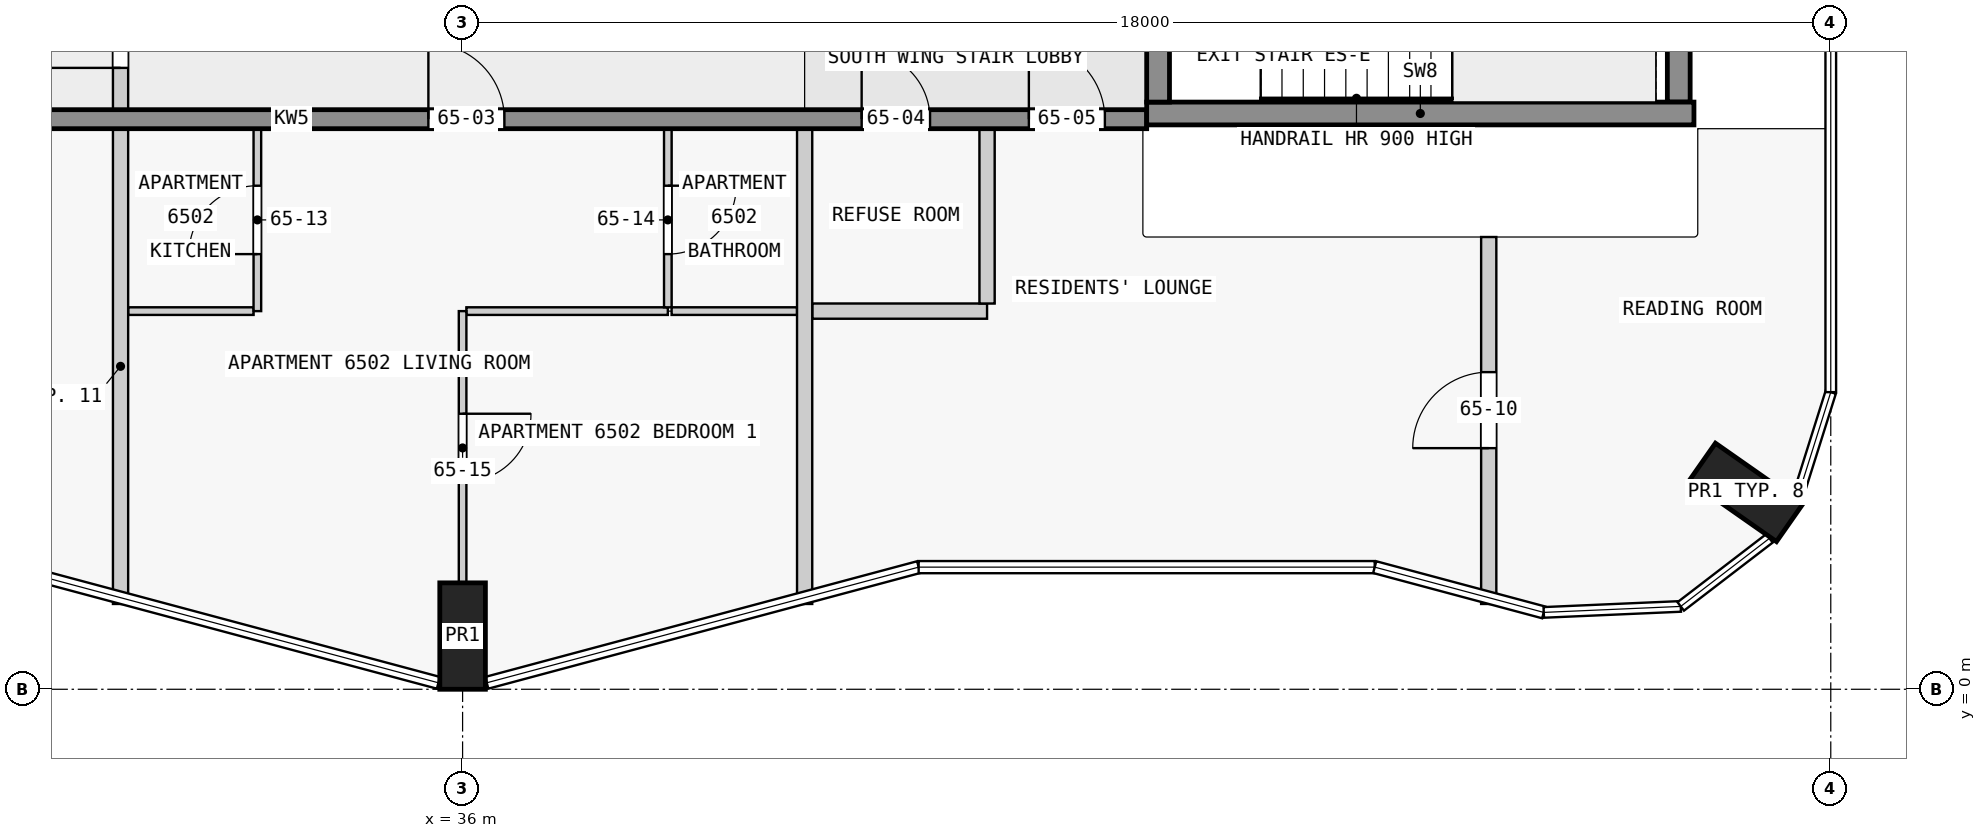
"""IFC4 building model, lengths in metres.
Left out: names, types, materials, properties, quantities, classifications, styles, units other than length and angle.
Written with IfcOpenShell. Run it as: python <this file> out.ifc"""

import sys

from ifc_helpers import new_model, si_unit, direction, frame, frame_2d, origin, origin_2d, place, context, subcontext, project, spatial, rectangle, extrude, element, fill, save


model = new_model("IFC4")
c1 = context("Model", 3, precision=1e-05, world=origin(), true_north=direction((0.0, 1.0)))
c2 = subcontext(c1, "Body", "Model", "MODEL_VIEW")
j1 = project(units=[si_unit("LENGTHUNIT", "METRE"), si_unit("PLANEANGLEUNIT", "RADIAN")], contexts=[c1])
p1 = place(None, origin())
s1 = spatial("IfcSite", under=j1, at=p1, CompositionType="ELEMENT")
p2 = place(p1, origin())
s2 = spatial("IfcBuilding", under=s1, at=p2, CompositionType="ELEMENT")
p3 = place(p2, frame((0.0, 0.0, 249.4)))
s3 = spatial("IfcBuildingStorey", under=s2, at=p3, CompositionType="ELEMENT", Elevation=249.4)
for number, where, z_axis, x_axis in (
    (1, (36.0, 0.7, 0.0), (0.0, 0.0, 1.0), (1.0, 0.0, 0.0)),
    (2, (52.884, 2.59, 0.0), (0.0, 0.0, 1.0), (0.574, 0.819, 0.0)),
):
    element("IfcColumn", number, at=place(p3, frame(where, z_axis=z_axis, x_axis=x_axis)), inside=s3, PredefinedType="COLUMN", context=c2, shape_type="SweptSolid", body=[
        extrude(rectangle(XDim=0.6, YDim=1.4, at=origin_2d()), origin(), (0.0, 0.0, 1.0), 3.5),
    ])
p4 = place(p3, frame((45.15, 7.725, 0.0), z_axis=(0.0, 0.0, 1.0), x_axis=(0.0, 1.0, 0.0)))
e3 = element("IfcWall", 3, at=p4, inside=s3, PredefinedType="SHEAR", context=c2, shape_type="SweptSolid", body=[
    extrude(rectangle(XDim=2.55, YDim=0.3, at=frame_2d((1.275, 0.0))), origin(), (0.0, 0.0, 1.0), 3.5),
])
p5 = place(p4, frame((0.725, 0.0, 0.0)))
e4 = element("IfcOpeningElement", 4, at=p5, cuts=e3, PredefinedType="OPENING", context=c2, shape_type="SweptSolid", body=[
    extrude(rectangle(XDim=1.1, YDim=2.1, at=frame_2d((0.55, 1.05))), frame((0.0, 0.16, 0.0), z_axis=(0.0, -1.0, 0.0), x_axis=(1.0, 0.0, 0.0)), (0.0, 0.0, 1.0), 0.32),
])
p6 = place(p3, frame((52.0, 7.725, 0.0), z_axis=(0.0, 0.0, 1.0), x_axis=(0.0, 1.0, 0.0)))
e5 = element("IfcWall", 5, at=p6, inside=s3, PredefinedType="SHEAR", context=c2, shape_type="SweptSolid", body=[
    extrude(rectangle(XDim=2.55, YDim=0.3, at=frame_2d((1.275, 0.0))), origin(), (0.0, 0.0, 1.0), 3.5),
])
p7 = place(p3, frame((45.0, 7.575, 0.0), z_axis=(0.0, 0.0, 1.0), x_axis=(1.0, 0.0, 0.0)))
e6 = element("IfcWall", 6, at=p7, inside=s3, PredefinedType="SHEAR", context=c2, shape_type="SweptSolid", body=[
    extrude(rectangle(XDim=7.2, YDim=0.3, at=frame_2d((3.6, 0.0))), origin(), (0.0, 0.0, 1.0), 3.5),
])
p8 = place(p3, frame((22.5, 7.5, 0.0), z_axis=(0.0, 0.0, 1.0), x_axis=(1.0, 0.0, 0.0)))
e7 = element("IfcWall", 7, at=p8, inside=s3, PredefinedType="SHEAR", context=c2, shape_type="SweptSolid", body=[
    extrude(rectangle(XDim=22.5, YDim=0.25, at=frame_2d((11.25, 0.0))), origin(), (0.0, 0.0, 1.0), 3.25),
])
p9 = place(p8, frame((1.75, 0.0, 0.0)))
e8 = element("IfcOpeningElement", 8, at=p9, cuts=e7, PredefinedType="OPENING", context=c2, shape_type="SweptSolid", body=[
    extrude(rectangle(XDim=1.0, YDim=2.1, at=frame_2d((0.5, 1.05))), frame((0.0, 0.135, 0.0), z_axis=(0.0, -1.0, 0.0), x_axis=(1.0, 0.0, 0.0)), (0.0, 0.0, 1.0), 0.27),
])
p10 = place(p8, frame((5.85, 0.0, 0.0)))
e9 = element("IfcOpeningElement", 9, at=p10, cuts=e7, PredefinedType="OPENING", context=c2, shape_type="SweptSolid", body=[
    extrude(rectangle(XDim=1.8, YDim=2.1, at=frame_2d((0.9, 1.05))), frame((0.0, 0.135, 0.0), z_axis=(0.0, -1.0, 0.0), x_axis=(1.0, 0.0, 0.0)), (0.0, 0.0, 1.0), 0.27),
])
p11 = place(p8, frame((13.05, 0.0, 0.0)))
e10 = element("IfcOpeningElement", 10, at=p11, cuts=e7, PredefinedType="OPENING", context=c2, shape_type="SweptSolid", body=[
    extrude(rectangle(XDim=1.0, YDim=2.1, at=frame_2d((0.5, 1.05))), frame((0.0, 0.135, 0.0), z_axis=(0.0, -1.0, 0.0), x_axis=(1.0, 0.0, 0.0)), (0.0, 0.0, 1.0), 0.27),
])
p12 = place(p8, frame((18.75, 0.0, 0.0)))
e11 = element("IfcOpeningElement", 11, at=p12, cuts=e7, PredefinedType="OPENING", context=c2, shape_type="SweptSolid", body=[
    extrude(rectangle(XDim=0.9, YDim=2.1, at=frame_2d((0.45, 1.05))), frame((0.0, 0.135, 0.0), z_axis=(0.0, -1.0, 0.0), x_axis=(1.0, 0.0, 0.0)), (0.0, 0.0, 1.0), 0.27),
])
p13 = place(p8, frame((20.95, 0.0, 0.0)))
e12 = element("IfcOpeningElement", 12, at=p13, cuts=e7, PredefinedType="OPENING", context=c2, shape_type="SweptSolid", body=[
    extrude(rectangle(XDim=1.0, YDim=2.1, at=frame_2d((0.5, 1.05))), frame((0.0, 0.135, 0.0), z_axis=(0.0, -1.0, 0.0), x_axis=(1.0, 0.0, 0.0)), (0.0, 0.0, 1.0), 0.27),
])
p14 = place(p3, frame((38.7, 4.975, 0.0), z_axis=(0.0, 0.0, 1.0), x_axis=(-1.0, 0.0, 0.0)))
e13 = element("IfcWall", 13, at=p14, inside=s3, PredefinedType="PARTITIONING", context=c2, shape_type="SweptSolid", body=[
    extrude(rectangle(XDim=2.65, YDim=0.1, at=frame_2d((1.325, 0.0))), origin(), (0.0, 0.0, 1.0), 3.25),
])
for number, where, z_axis, x_axis in (
    (14, (31.6, 4.975, 0.0), (0.0, 0.0, 1.0), (1.0, 0.0, 0.0)),
    (15, (38.75, 4.975, 0.0), (0.0, 0.0, 1.0), (1.0, 0.0, 0.0)),
):
    element("IfcWall", number, at=place(p3, frame(where, z_axis=z_axis, x_axis=x_axis)), inside=s3, PredefinedType="PARTITIONING", context=c2, shape_type="SweptSolid", body=[
        extrude(rectangle(XDim=1.65, YDim=0.1, at=frame_2d((0.825, 0.0))), origin(), (0.0, 0.0, 1.0), 3.25),
    ])
p15 = place(p3, frame((40.6, 4.975, 0.0), z_axis=(0.0, 0.0, 1.0), x_axis=(1.0, 0.0, 0.0)))
e16 = element("IfcWall", 16, at=p15, inside=s3, PredefinedType="PARTITIONING", context=c2, shape_type="SweptSolid", body=[
    extrude(rectangle(XDim=2.3, YDim=0.2, at=frame_2d((1.15, 0.0))), origin(), (0.0, 0.0, 1.0), 3.25),
])
p16 = place(p3, frame((31.5, 1.122, 0.0), z_axis=(0.0, 0.0, 1.0), x_axis=(0.0, 1.0, 0.0)))
e17 = element("IfcWall", 17, at=p16, inside=s3, PredefinedType="PARTITIONING", context=c2, shape_type="SweptSolid", body=[
    extrude(rectangle(XDim=6.253, YDim=0.2, at=frame_2d((3.126, 0.0))), origin(), (0.0, 0.0, 1.0), 3.25),
])
p17 = place(p3, frame((33.3, 4.975, 0.0), z_axis=(0.0, 0.0, 1.0), x_axis=(0.0, 1.0, 0.0)))
e18 = element("IfcWall", 18, at=p17, inside=s3, PredefinedType="PARTITIONING", context=c2, shape_type="SweptSolid", body=[
    extrude(rectangle(XDim=2.4, YDim=0.1, at=frame_2d((1.2, 0.0))), origin(), (0.0, 0.0, 1.0), 3.25),
])
p18 = place(p17, frame((0.75, 0.0, 0.0)))
e19 = element("IfcOpeningElement", 19, at=p18, cuts=e18, PredefinedType="OPENING", context=c2, shape_type="SweptSolid", body=[
    extrude(rectangle(XDim=0.9, YDim=2.1, at=frame_2d((0.45, 1.05))), frame((0.0, 0.06, 0.0), z_axis=(0.0, -1.0, 0.0), x_axis=(1.0, 0.0, 0.0)), (0.0, 0.0, 1.0), 0.12),
])
p19 = place(p3, frame((36.0, 4.975, 0.0), z_axis=(0.0, 0.0, 1.0), x_axis=(0.0, -1.0, 0.0)))
e20 = element("IfcWall", 20, at=p19, inside=s3, PredefinedType="PARTITIONING", context=c2, shape_type="SweptSolid", body=[
    extrude(rectangle(XDim=3.575, YDim=0.1, at=frame_2d((1.788, 0.0))), origin(), (0.0, 0.0, 1.0), 3.25),
])
p20 = place(p19, frame((1.35, 0.0, 0.0)))
e21 = element("IfcOpeningElement", 21, at=p20, cuts=e20, PredefinedType="OPENING", context=c2, shape_type="SweptSolid", body=[
    extrude(rectangle(XDim=0.9, YDim=2.1, at=frame_2d((0.45, 1.05))), frame((0.0, 0.06, 0.0), z_axis=(0.0, -1.0, 0.0), x_axis=(1.0, 0.0, 0.0)), (0.0, 0.0, 1.0), 0.12),
])
p21 = place(p3, frame((38.7, 7.375, 0.0), z_axis=(0.0, 0.0, 1.0), x_axis=(0.0, -1.0, 0.0)))
e22 = element("IfcWall", 22, at=p21, inside=s3, PredefinedType="PARTITIONING", context=c2, shape_type="SweptSolid", body=[
    extrude(rectangle(XDim=2.35, YDim=0.1, at=frame_2d((1.175, 0.0))), origin(), (0.0, 0.0, 1.0), 3.25),
])
p22 = place(p21, frame((0.75, 0.0, 0.0)))
e23 = element("IfcOpeningElement", 23, at=p22, cuts=e22, PredefinedType="OPENING", context=c2, shape_type="SweptSolid", body=[
    extrude(rectangle(XDim=0.9, YDim=2.1, at=frame_2d((0.45, 1.05))), frame((0.0, 0.06, 0.0), z_axis=(0.0, -1.0, 0.0), x_axis=(1.0, 0.0, 0.0)), (0.0, 0.0, 1.0), 0.12),
])
p23 = place(p3, frame((40.5, 1.122, 0.0), z_axis=(0.0, 0.0, 1.0), x_axis=(0.0, 1.0, 0.0)))
e24 = element("IfcWall", 24, at=p23, inside=s3, PredefinedType="PARTITIONING", context=c2, shape_type="SweptSolid", body=[
    extrude(rectangle(XDim=6.253, YDim=0.2, at=frame_2d((3.126, 0.0))), origin(), (0.0, 0.0, 1.0), 3.25),
])
p24 = place(p3, frame((42.9, 5.075, 0.0), z_axis=(0.0, 0.0, 1.0), x_axis=(0.0, 1.0, 0.0)))
e25 = element("IfcWall", 25, at=p24, inside=s3, PredefinedType="PARTITIONING", context=c2, shape_type="SweptSolid", body=[
    extrude(rectangle(XDim=2.3, YDim=0.2, at=frame_2d((1.15, 0.0))), origin(), (0.0, 0.0, 1.0), 3.25),
])
p25 = place(p3, frame((49.5, 1.122, 0.0), z_axis=(0.0, 0.0, 1.0), x_axis=(0.0, 1.0, 0.0)))
e26 = element("IfcWall", 26, at=p25, inside=s3, PredefinedType="PARTITIONING", context=c2, shape_type="SweptSolid", body=[
    extrude(rectangle(XDim=4.828, YDim=0.2, at=frame_2d((2.414, 0.0))), origin(), (0.0, 0.0, 1.0), 3.25),
])
p26 = place(p25, frame((2.05, 0.0, 0.0)))
e27 = element("IfcOpeningElement", 27, at=p26, cuts=e26, PredefinedType="OPENING", context=c2, shape_type="SweptSolid", body=[
    extrude(rectangle(XDim=1.0, YDim=2.1, at=frame_2d((0.5, 1.05))), frame((0.0, 0.11, 0.0), z_axis=(0.0, -1.0, 0.0), x_axis=(1.0, 0.0, 0.0)), (0.0, 0.0, 1.0), 0.22),
])
p27 = place(p3, frame((31.5, 7.475, 0.0), z_axis=(0.0, 0.0, 1.0), x_axis=(0.0, 1.0, 0.0)))
e28 = element("IfcWall", 28, at=p27, inside=s3, PredefinedType="PARTITIONING", context=c2, shape_type="SweptSolid", body=[
    extrude(rectangle(XDim=3.15, YDim=0.2, at=frame_2d((1.575, 0.0))), origin(), (0.0, 0.0, 1.0), 3.25),
])
p28 = place(p27, frame((0.7, 0.0, 0.0)))
e29 = element("IfcOpeningElement", 29, at=p28, cuts=e28, PredefinedType="OPENING", context=c2, shape_type="SweptSolid", body=[
    extrude(rectangle(XDim=1.8, YDim=2.1, at=frame_2d((0.9, 1.05))), frame((0.0, 0.11, 0.0), z_axis=(0.0, -1.0, 0.0), x_axis=(1.0, 0.0, 0.0)), (0.0, 0.0, 1.0), 0.22),
])
p29 = place(p11, origin())
e30 = element("IfcDoor", 30, at=p29, inside=s3, OperationType="SINGLE_SWING_RIGHT", PredefinedType="DOOR", context=c2, shape_type="SweptSolid", body=[
    extrude(rectangle(XDim=1.0, YDim=2.1, at=frame_2d((0.5, 1.05))), frame((0.0, 0.025, 0.0), z_axis=(0.0, -1.0, 0.0), x_axis=(1.0, 0.0, 0.0)), (0.0, 0.0, 1.0), 0.05),
])
fill(e10, e30)
p30 = place(p12, origin())
e31 = element("IfcDoor", 31, at=p30, inside=s3, OperationType="SINGLE_SWING_RIGHT", PredefinedType="DOOR", context=c2, shape_type="SweptSolid", body=[
    extrude(rectangle(XDim=0.9, YDim=2.1, at=frame_2d((0.45, 1.05))), frame((0.0, 0.025, 0.0), z_axis=(0.0, -1.0, 0.0), x_axis=(1.0, 0.0, 0.0)), (0.0, 0.0, 1.0), 0.05),
])
fill(e11, e31)
p31 = place(p13, origin())
e32 = element("IfcDoor", 32, at=p31, inside=s3, OperationType="SINGLE_SWING_RIGHT", PredefinedType="DOOR", context=c2, shape_type="SweptSolid", body=[
    extrude(rectangle(XDim=1.0, YDim=2.1, at=frame_2d((0.5, 1.05))), frame((0.0, 0.025, 0.0), z_axis=(0.0, -1.0, 0.0), x_axis=(1.0, 0.0, 0.0)), (0.0, 0.0, 1.0), 0.05),
])
fill(e12, e32)
p32 = place(p28, origin())
e33 = element("IfcDoor", 33, at=p32, inside=s3, OperationType="SINGLE_SWING_RIGHT", PredefinedType="DOOR", context=c2, shape_type="SweptSolid", body=[
    extrude(rectangle(XDim=1.8, YDim=2.1, at=frame_2d((0.9, 1.05))), frame((0.0, 0.025, 0.0), z_axis=(0.0, -1.0, 0.0), x_axis=(1.0, 0.0, 0.0)), (0.0, 0.0, 1.0), 0.05),
])
fill(e29, e33)
p33 = place(p26, origin())
e34 = element("IfcDoor", 34, at=p33, inside=s3, OperationType="SINGLE_SWING_RIGHT", PredefinedType="DOOR", context=c2, shape_type="SweptSolid", body=[
    extrude(rectangle(XDim=1.0, YDim=2.1, at=frame_2d((0.5, 1.05))), frame((0.0, 0.025, 0.0), z_axis=(0.0, -1.0, 0.0), x_axis=(1.0, 0.0, 0.0)), (0.0, 0.0, 1.0), 0.05),
])
fill(e27, e34)
p34 = place(p18, origin())
e35 = element("IfcDoor", 35, at=p34, inside=s3, OperationType="SINGLE_SWING_LEFT", PredefinedType="DOOR", context=c2, shape_type="SweptSolid", body=[
    extrude(rectangle(XDim=0.9, YDim=2.1, at=frame_2d((0.45, 1.05))), frame((0.0, 0.025, 0.0), z_axis=(0.0, -1.0, 0.0), x_axis=(1.0, 0.0, 0.0)), (0.0, 0.0, 1.0), 0.05),
])
fill(e19, e35)
p35 = place(p22, origin())
e36 = element("IfcDoor", 36, at=p35, inside=s3, OperationType="SINGLE_SWING_RIGHT", PredefinedType="DOOR", context=c2, shape_type="SweptSolid", body=[
    extrude(rectangle(XDim=0.9, YDim=2.1, at=frame_2d((0.45, 1.05))), frame((0.0, 0.025, 0.0), z_axis=(0.0, -1.0, 0.0), x_axis=(1.0, 0.0, 0.0)), (0.0, 0.0, 1.0), 0.05),
])
fill(e23, e36)
p36 = place(p20, origin())
e37 = element("IfcDoor", 37, at=p36, inside=s3, OperationType="SINGLE_SWING_RIGHT", PredefinedType="DOOR", context=c2, shape_type="SweptSolid", body=[
    extrude(rectangle(XDim=0.9, YDim=2.1, at=frame_2d((0.45, 1.05))), frame((0.0, 0.025, 0.0), z_axis=(0.0, -1.0, 0.0), x_axis=(1.0, 0.0, 0.0)), (0.0, 0.0, 1.0), 0.05),
])
fill(e21, e37)
save(model, sys.argv[1])
